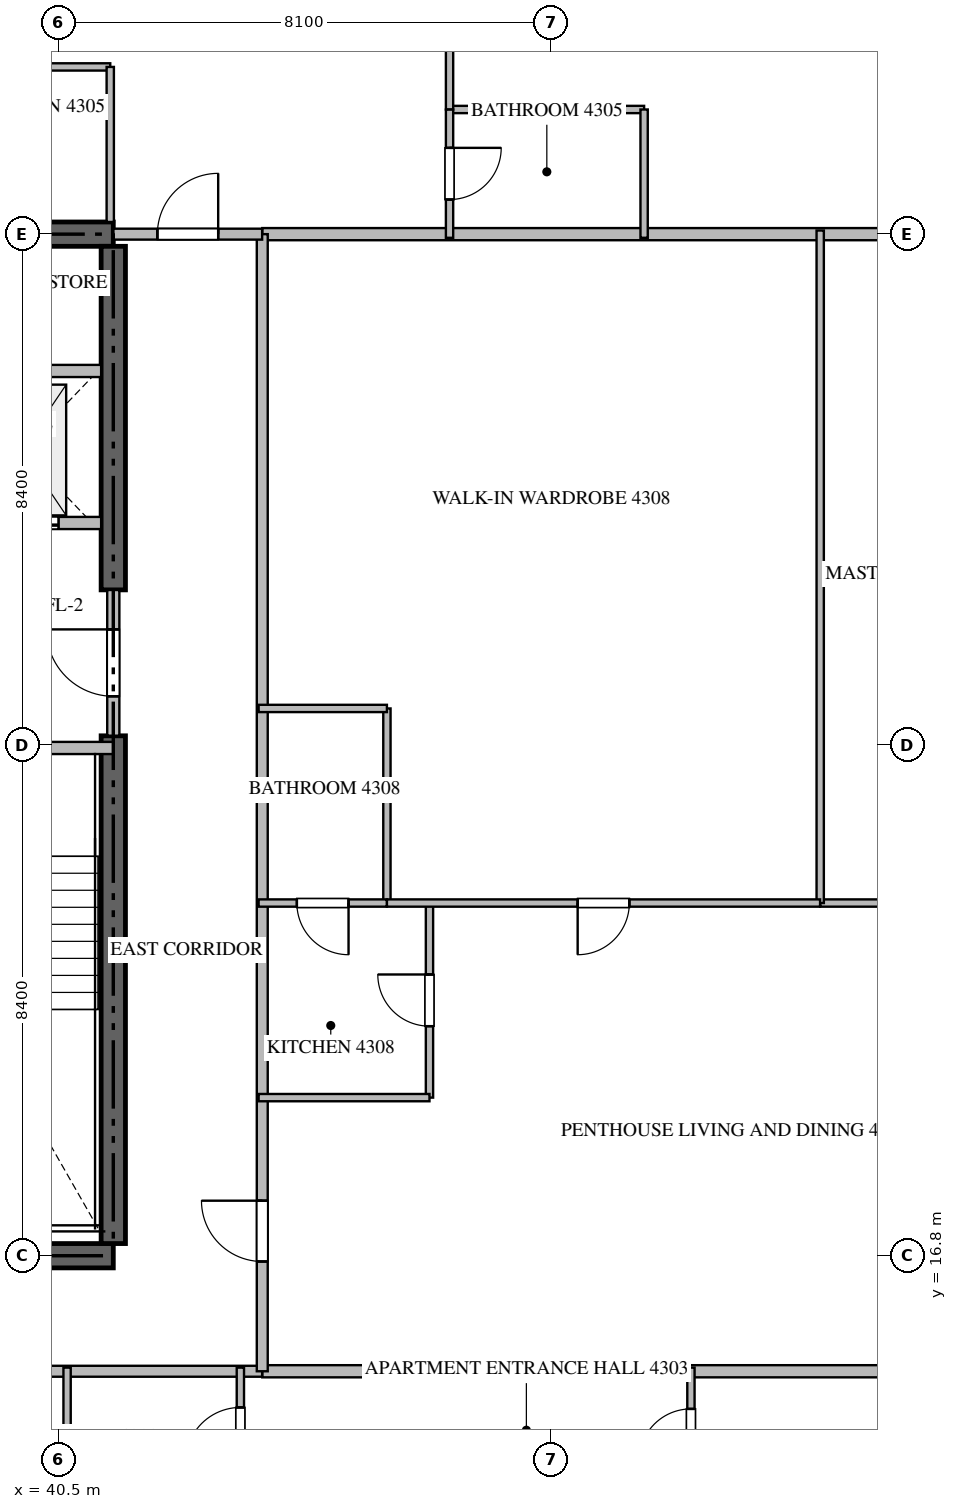
"""IFC4 building model, lengths in metres.
Left out: names, types, materials, properties, quantities, classifications, styles, units other than length and angle.
Written with IfcOpenShell. Run it as: python <this file> out.ifc"""

import sys

from ifc_helpers import new_model, si_unit, direction, frame, frame_2d, origin, place, context, subcontext, project, spatial, rectangle, extrude, source, transform, mapped, element, fill, save


model = new_model("IFC4")
c1 = context("Model", 3, precision=1e-05, world=origin(), true_north=direction((0.0, 1.0)))
c2 = subcontext(c1, "Body", "Model", "MODEL_VIEW")
j1 = project(units=[si_unit("LENGTHUNIT", "METRE"), si_unit("PLANEANGLEUNIT", "RADIAN")], contexts=[c1])
p1 = place(None, origin())
s1 = spatial("IfcSite", under=j1, at=p1, CompositionType="ELEMENT")
p2 = place(p1, origin())
s2 = spatial("IfcBuilding", under=s1, at=p2, CompositionType="ELEMENT")
p3 = place(p2, frame((0.0, 0.0, 172.65)))
s3 = spatial("IfcBuildingStorey", under=s2, at=p3, CompositionType="ELEMENT", Elevation=172.65)
for number, where, z_axis, x_axis in (
    (1, (23.4, 16.8, -0.26), (0.0, 0.0, 1.0), (1.0, 0.0, 0.0)),
    (2, (41.4, 33.6, -0.26), (0.0, 0.0, 1.0), (-1.0, 0.0, 0.0)),
):
    element("IfcWall", number, at=place(p3, frame(where, z_axis=z_axis, x_axis=x_axis)), inside=s3, PredefinedType="SHEAR", context=c2, shape_type="SweptSolid", body=[
        extrude(rectangle(XDim=18.0, YDim=0.4, at=frame_2d((9.0, 0.0))), origin(), (0.0, 0.0, 1.0), 3.748),
    ])
p4 = place(p3, frame((41.4, 17.0, -0.26), z_axis=(0.0, 0.0, 1.0), x_axis=(0.0, 1.0, 0.0)))
e3 = element("IfcWall", 3, at=p4, inside=s3, PredefinedType="SHEAR", context=c2, shape_type="SweptSolid", body=[
    extrude(rectangle(XDim=8.35, YDim=0.4, at=frame_2d((4.175, 0.0))), origin(), (0.0, 0.0, 1.0), 3.748),
])
p5 = place(p3, frame((41.4, 27.75, -0.26), z_axis=(0.0, 0.0, 1.0), x_axis=(0.0, 1.0, 0.0)))
e4 = element("IfcWall", 4, at=p5, inside=s3, PredefinedType="SHEAR", context=c2, shape_type="SweptSolid", body=[
    extrude(rectangle(XDim=5.65, YDim=0.4, at=frame_2d((2.825, 0.0))), origin(), (0.0, 0.0, 1.0), 3.748),
])
p6 = place(p3, frame((36.95, 25.15, 0.0), z_axis=(0.0, 0.0, 1.0), x_axis=(1.0, 0.0, 0.0)))
e5 = element("IfcWall", 5, at=p6, inside=s3, PredefinedType="STANDARD", context=c2, shape_type="SweptSolid", body=[
    extrude(rectangle(XDim=4.45, YDim=0.2, at=frame_2d((2.225, 0.0))), origin(), (0.0, 0.0, 1.0), 3.49),
])
p7 = place(p6, frame((1.65, 0.0, 0.0)))
e6 = element("IfcOpeningElement", 6, at=p7, cuts=e5, PredefinedType="OPENING", context=c2, shape_type="SweptSolid", body=[
    extrude(rectangle(XDim=1.1, YDim=2.15, at=frame_2d((0.55, 1.075))), frame((0.0, 0.11, 0.0), z_axis=(0.0, -1.0, 0.0), x_axis=(1.0, 0.0, 0.0)), (0.0, 0.0, 1.0), 0.22),
])
p8 = place(p3, frame((38.75, 28.85, 0.0), z_axis=(0.0, 0.0, 1.0), x_axis=(1.0, 0.0, 0.0)))
e7 = element("IfcWall", 7, at=p8, inside=s3, PredefinedType="STANDARD", context=c2, shape_type="SweptSolid", body=[
    extrude(rectangle(XDim=2.45, YDim=0.2, at=frame_2d((1.225, 0.0))), origin(), (0.0, 0.0, 1.0), 3.49),
])
p9 = place(p8, frame((0.55, 0.0, 0.0)))
e8 = element("IfcOpeningElement", 8, at=p9, cuts=e7, PredefinedType="OPENING", context=c2, shape_type="SweptSolid", body=[
    extrude(rectangle(XDim=1.2, YDim=2.2, at=frame_2d((0.6, 1.1))), frame((0.0, 0.11, 0.0), z_axis=(0.0, -1.0, 0.0), x_axis=(1.0, 0.0, 0.0)), (0.0, 0.0, 1.0), 0.22),
])
p10 = place(p3, frame((38.75, 31.35, 0.0), z_axis=(0.0, 0.0, 1.0), x_axis=(1.0, 0.0, 0.0)))
e9 = element("IfcWall", 9, at=p10, inside=s3, PredefinedType="STANDARD", context=c2, shape_type="SweptSolid", body=[
    extrude(rectangle(XDim=2.45, YDim=0.2, at=frame_2d((1.225, 0.0))), origin(), (0.0, 0.0, 1.0), 3.49),
])
p11 = place(p3, frame((41.4, 25.352, 0.0), z_axis=(0.0, 0.0, 1.0), x_axis=(0.0, 1.0, 0.0)))
e10 = element("IfcWall", 10, at=p11, inside=s3, PredefinedType="STANDARD", context=c2, shape_type="SweptSolid", body=[
    extrude(rectangle(XDim=2.396, YDim=0.2, at=frame_2d((1.198, 0.0))), origin(), (0.0, 0.0, 1.0), 3.49),
])
p12 = place(p11, frame((0.648, 0.0, 0.0)))
e11 = element("IfcOpeningElement", 11, at=p12, cuts=e10, PredefinedType="OPENING", context=c2, shape_type="SweptSolid", body=[
    extrude(rectangle(XDim=1.1, YDim=2.15, at=frame_2d((0.55, 1.075))), frame((0.0, 0.11, 0.0), z_axis=(0.0, -1.0, 0.0), x_axis=(1.0, 0.0, 0.0)), (0.0, 0.0, 1.0), 0.22),
])
for number, where, z_axis, x_axis in (
    (12, (43.85, 14.9, 0.0), (0.0, 0.0, 1.0), (1.0, 0.0, 0.0)),
    (13, (43.85, 33.6, 0.0), (0.0, 0.0, 1.0), (1.0, 0.0, 0.0)),
):
    element("IfcWall", number, at=place(p3, frame(where, z_axis=z_axis, x_axis=x_axis)), inside=s3, PredefinedType="PARTITIONING", context=c2, shape_type="SweptSolid", body=[
        extrude(rectangle(XDim=13.068, YDim=0.2, at=frame_2d((6.534, 0.0))), origin(), (0.0, 0.0, 1.0), 3.49),
    ])
p13 = place(p3, frame((20.952, 14.9, 0.0), z_axis=(0.0, 0.0, 1.0), x_axis=(1.0, 0.0, 0.0)))
e14 = element("IfcWall", 14, at=p13, inside=s3, PredefinedType="PARTITIONING", context=c2, shape_type="SweptSolid", body=[
    extrude(rectangle(XDim=22.896, YDim=0.18, at=frame_2d((11.448, 0.0))), origin(), (0.0, 0.0, 1.0), 3.49),
])
p14 = place(p13, frame((2.387, 0.0, 0.0)))
e15 = element("IfcOpeningElement", 15, at=p14, cuts=e14, PredefinedType="OPENING", context=c2, shape_type="SweptSolid", body=[
    extrude(rectangle(XDim=1.0, YDim=2.15, at=frame_2d((0.5, 1.075))), frame((0.0, 0.1, 0.0), z_axis=(0.0, -1.0, 0.0), x_axis=(1.0, 0.0, 0.0)), (0.0, 0.0, 1.0), 0.2),
])
p15 = place(p13, frame((6.591, 0.0, 0.0)))
e16 = element("IfcOpeningElement", 16, at=p15, cuts=e14, PredefinedType="OPENING", context=c2, shape_type="SweptSolid", body=[
    extrude(rectangle(XDim=1.0, YDim=2.15, at=frame_2d((0.5, 1.075))), frame((0.0, 0.1, 0.0), z_axis=(0.0, -1.0, 0.0), x_axis=(1.0, 0.0, 0.0)), (0.0, 0.0, 1.0), 0.2),
])
p16 = place(p13, frame((16.51, 0.0, 0.0)))
e17 = element("IfcOpeningElement", 17, at=p16, cuts=e14, PredefinedType="OPENING", context=c2, shape_type="SweptSolid", body=[
    extrude(rectangle(XDim=1.0, YDim=2.15, at=frame_2d((0.5, 1.075))), frame((0.0, 0.1, 0.0), z_axis=(0.0, -1.0, 0.0), x_axis=(1.0, 0.0, 0.0)), (0.0, 0.0, 1.0), 0.2),
])
p17 = place(p3, frame((43.85, 14.9, 0.0), z_axis=(0.0, 0.0, 1.0), x_axis=(0.0, 1.0, 0.0)))
e18 = element("IfcWall", 18, at=p17, inside=s3, PredefinedType="PARTITIONING", context=c2, shape_type="SweptSolid", body=[
    extrude(rectangle(XDim=18.7, YDim=0.18, at=frame_2d((9.35, 0.0))), origin(), (0.0, 0.0, 1.0), 3.49),
])
p18 = place(p17, frame((1.805, 0.0, 0.0)))
e19 = element("IfcOpeningElement", 19, at=p18, cuts=e18, PredefinedType="OPENING", context=c2, shape_type="SweptSolid", body=[
    extrude(rectangle(XDim=1.0, YDim=2.15, at=frame_2d((0.5, 1.075))), frame((0.0, 0.1, 0.0), z_axis=(0.0, -1.0, 0.0), x_axis=(1.0, 0.0, 0.0)), (0.0, 0.0, 1.0), 0.2),
])
p19 = place(p3, frame((41.402, 33.6, 0.0), z_axis=(0.0, 0.0, 1.0), x_axis=(1.0, 0.0, 0.0)))
e20 = element("IfcWall", 20, at=p19, inside=s3, PredefinedType="PARTITIONING", context=c2, shape_type="SweptSolid", body=[
    extrude(rectangle(XDim=2.446, YDim=0.18, at=frame_2d((1.223, 0.0))), origin(), (0.0, 0.0, 1.0), 3.49),
])
p20 = place(p19, frame((0.723, 0.0, 0.0)))
e21 = element("IfcOpeningElement", 21, at=p20, cuts=e20, PredefinedType="OPENING", context=c2, shape_type="SweptSolid", body=[
    extrude(rectangle(XDim=1.0, YDim=2.15, at=frame_2d((0.5, 1.075))), frame((0.0, 0.1, 0.0), z_axis=(0.0, -1.0, 0.0), x_axis=(1.0, 0.0, 0.0)), (0.0, 0.0, 1.0), 0.2),
])
p21 = place(p3, frame((40.64, 12.15, 0.0), z_axis=(0.0, 0.0, 1.0), x_axis=(0.0, 1.0, 0.0)))
e22 = element("IfcWall", 22, at=p21, inside=s3, PredefinedType="PARTITIONING", context=c2, shape_type="SweptSolid", body=[
    extrude(rectangle(XDim=2.81, YDim=0.12, at=frame_2d((1.405, 0.0))), origin(), (0.0, 0.0, 1.0), 3.49),
])
p22 = place(p3, frame((43.49, 12.75, 0.0), z_axis=(0.0, 0.0, 1.0), x_axis=(0.0, 1.0, 0.0)))
e23 = element("IfcWall", 23, at=p22, inside=s3, PredefinedType="PARTITIONING", context=c2, shape_type="SweptSolid", body=[
    extrude(rectangle(XDim=2.21, YDim=0.12, at=frame_2d((1.105, 0.0))), origin(), (0.0, 0.0, 1.0), 3.49),
])
p23 = place(p22, frame((0.655, 0.0, 0.0)))
e24 = element("IfcOpeningElement", 24, at=p23, cuts=e23, PredefinedType="OPENING", context=c2, shape_type="SweptSolid", body=[
    extrude(rectangle(XDim=0.9, YDim=2.1, at=frame_2d((0.45, 1.05))), frame((0.0, 0.07, 0.0), z_axis=(0.0, -1.0, 0.0), x_axis=(1.0, 0.0, 0.0)), (0.0, 0.0, 1.0), 0.14),
])
p24 = place(p3, frame((50.9, 12.752, 0.0), z_axis=(0.0, 0.0, 1.0), x_axis=(0.0, 1.0, 0.0)))
e25 = element("IfcWall", 25, at=p24, inside=s3, PredefinedType="PARTITIONING", context=c2, shape_type="SweptSolid", body=[
    extrude(rectangle(XDim=2.208, YDim=0.12, at=frame_2d((1.104, 0.0))), origin(), (0.0, 0.0, 1.0), 3.49),
])
p25 = place(p24, frame((0.679, 0.0, 0.0)))
e26 = element("IfcOpeningElement", 26, at=p25, cuts=e25, PredefinedType="OPENING", context=c2, shape_type="SweptSolid", body=[
    extrude(rectangle(XDim=0.85, YDim=2.1, at=frame_2d((0.425, 1.05))), frame((0.0, 0.07, 0.0), z_axis=(0.0, -1.0, 0.0), x_axis=(1.0, 0.0, 0.0)), (0.0, 0.0, 1.0), 0.14),
])
p26 = place(p3, frame((38.5, 36.35, 0.0), z_axis=(0.0, 0.0, 1.0), x_axis=(1.0, 0.0, 0.0)))
e27 = element("IfcWall", 27, at=p26, inside=s3, PredefinedType="PARTITIONING", context=c2, shape_type="SweptSolid", body=[
    extrude(rectangle(XDim=2.85, YDim=0.12, at=frame_2d((1.425, 0.0))), origin(), (0.0, 0.0, 1.0), 3.49),
])
p27 = place(p26, frame((1.0, 0.0, 0.0)))
e28 = element("IfcOpeningElement", 28, at=p27, cuts=e27, PredefinedType="OPENING", context=c2, shape_type="SweptSolid", body=[
    extrude(rectangle(XDim=0.85, YDim=2.1, at=frame_2d((0.425, 1.05))), frame((0.0, 0.07, 0.0), z_axis=(0.0, -1.0, 0.0), x_axis=(1.0, 0.0, 0.0)), (0.0, 0.0, 1.0), 0.14),
])
p28 = place(p3, frame((41.35, 36.35, 0.0), z_axis=(0.0, 0.0, 1.0), x_axis=(0.0, -1.0, 0.0)))
e29 = element("IfcWall", 29, at=p28, inside=s3, PredefinedType="PARTITIONING", context=c2, shape_type="SweptSolid", body=[
    extrude(rectangle(XDim=2.55, YDim=0.12, at=frame_2d((1.275, 0.0))), origin(), (0.0, 0.0, 1.0), 3.49),
])
p29 = place(p3, frame((46.93, 35.65, 0.0), z_axis=(0.0, 0.0, 1.0), x_axis=(1.0, 0.0, 0.0)))
e30 = element("IfcWall", 30, at=p29, inside=s3, PredefinedType="PARTITIONING", context=c2, shape_type="SweptSolid", body=[
    extrude(rectangle(XDim=3.2, YDim=0.12, at=frame_2d((1.6, 0.0))), origin(), (0.0, 0.0, 1.0), 3.49),
])
p30 = place(p3, frame((50.13, 35.65, 0.0), z_axis=(0.0, 0.0, 1.0), x_axis=(0.0, -1.0, 0.0)))
e31 = element("IfcWall", 31, at=p30, inside=s3, PredefinedType="PARTITIONING", context=c2, shape_type="SweptSolid", body=[
    extrude(rectangle(XDim=2.11, YDim=0.12, at=frame_2d((1.055, 0.0))), origin(), (0.0, 0.0, 1.0), 3.49),
])
p31 = place(p3, frame((46.93, 41.073, 0.0), z_axis=(0.0, 0.0, 1.0), x_axis=(0.0, -1.0, 0.0)))
e32 = element("IfcWall", 32, at=p31, inside=s3, PredefinedType="PARTITIONING", context=c2, shape_type="SweptSolid", body=[
    extrude(rectangle(XDim=5.423, YDim=0.12, at=frame_2d((2.711, 0.0))), origin(), (0.0, 0.0, 1.0), 3.49),
])
p32 = place(p31, frame((2.287, 0.0, 0.0)))
e33 = element("IfcOpeningElement", 33, at=p32, cuts=e32, PredefinedType="OPENING", context=c2, shape_type="SweptSolid", body=[
    extrude(rectangle(XDim=0.85, YDim=2.1, at=frame_2d((0.425, 1.05))), frame((0.0, 0.07, 0.0), z_axis=(0.0, -1.0, 0.0), x_axis=(1.0, 0.0, 0.0)), (0.0, 0.0, 1.0), 0.14),
])
p33 = place(p3, frame((46.93, 35.648, 0.0), z_axis=(0.0, 0.0, 1.0), x_axis=(0.0, -1.0, 0.0)))
e34 = element("IfcWall", 34, at=p33, inside=s3, PredefinedType="PARTITIONING", context=c2, shape_type="SweptSolid", body=[
    extrude(rectangle(XDim=2.108, YDim=0.12, at=frame_2d((1.054, 0.0))), origin(), (0.0, 0.0, 1.0), 3.49),
])
p34 = place(p33, frame((0.629, 0.0, 0.0)))
e35 = element("IfcOpeningElement", 35, at=p34, cuts=e34, PredefinedType="OPENING", context=c2, shape_type="SweptSolid", body=[
    extrude(rectangle(XDim=0.85, YDim=2.1, at=frame_2d((0.425, 1.05))), frame((0.0, 0.07, 0.0), z_axis=(0.0, -1.0, 0.0), x_axis=(1.0, 0.0, 0.0)), (0.0, 0.0, 1.0), 0.14),
])
p35 = place(p3, frame((46.6, 19.4, 0.0), z_axis=(0.0, 0.0, 1.0), x_axis=(0.0, 1.0, 0.0)))
e36 = element("IfcWall", 36, at=p35, inside=s3, PredefinedType="PARTITIONING", context=c2, shape_type="SweptSolid", body=[
    extrude(rectangle(XDim=3.2, YDim=0.12, at=frame_2d((1.6, 0.0))), origin(), (0.0, 0.0, 1.0), 3.49),
])
p36 = place(p35, frame((1.175, 0.0, 0.0)))
e37 = element("IfcOpeningElement", 37, at=p36, cuts=e36, PredefinedType="OPENING", context=c2, shape_type="SweptSolid", body=[
    extrude(rectangle(XDim=0.85, YDim=2.1, at=frame_2d((0.425, 1.05))), frame((0.0, 0.07, 0.0), z_axis=(0.0, -1.0, 0.0), x_axis=(1.0, 0.0, 0.0)), (0.0, 0.0, 1.0), 0.14),
])
p37 = place(p3, frame((46.6, 19.4, 0.0), z_axis=(0.0, 0.0, 1.0), x_axis=(-1.0, 0.0, 0.0)))
e38 = element("IfcWall", 38, at=p37, inside=s3, PredefinedType="PARTITIONING", context=c2, shape_type="SweptSolid", body=[
    extrude(rectangle(XDim=2.81, YDim=0.12, at=frame_2d((1.405, 0.0))), origin(), (0.0, 0.0, 1.0), 3.49),
])
p38 = place(p3, frame((56.905, 22.6, 0.0), z_axis=(0.0, 0.0, 1.0), x_axis=(-1.0, 0.0, 0.0)))
e39 = element("IfcWall", 39, at=p38, inside=s3, PredefinedType="PARTITIONING", context=c2, shape_type="SweptSolid", body=[
    extrude(rectangle(XDim=3.879, YDim=0.12, at=frame_2d((1.939, 0.0))), origin(), (0.0, 0.0, 1.0), 3.49),
])
p39 = place(p38, frame((1.918, 0.0, 0.0)))
e40 = element("IfcOpeningElement", 40, at=p39, cuts=e39, PredefinedType="OPENING", context=c2, shape_type="SweptSolid", body=[
    extrude(rectangle(XDim=0.9, YDim=2.1, at=frame_2d((0.45, 1.05))), frame((0.0, 0.07, 0.0), z_axis=(0.0, -1.0, 0.0), x_axis=(1.0, 0.0, 0.0)), (0.0, 0.0, 1.0), 0.14),
])
p40 = place(p3, frame((53.026, 22.6, 0.0), z_axis=(0.0, 0.0, 1.0), x_axis=(0.0, 1.0, 0.0)))
e41 = element("IfcWall", 41, at=p40, inside=s3, PredefinedType="PARTITIONING", context=c2, shape_type="SweptSolid", body=[
    extrude(rectangle(XDim=11.06, YDim=0.12, at=frame_2d((5.53, 0.0))), origin(), (0.0, 0.0, 1.0), 3.49),
])
p41 = place(p3, frame((45.9, 22.6, 0.0), z_axis=(0.0, 0.0, 1.0), x_axis=(0.0, 1.0, 0.0)))
e42 = element("IfcWall", 42, at=p41, inside=s3, PredefinedType="PARTITIONING", context=c2, shape_type="SweptSolid", body=[
    extrude(rectangle(XDim=3.2, YDim=0.12, at=frame_2d((1.6, 0.0))), origin(), (0.0, 0.0, 1.0), 3.49),
])
p42 = place(p3, frame((45.9, 25.8, 0.0), z_axis=(0.0, 0.0, 1.0), x_axis=(-1.0, 0.0, 0.0)))
e43 = element("IfcWall", 43, at=p42, inside=s3, PredefinedType="PARTITIONING", context=c2, shape_type="SweptSolid", body=[
    extrude(rectangle(XDim=2.11, YDim=0.12, at=frame_2d((1.055, 0.0))), origin(), (0.0, 0.0, 1.0), 3.49),
])
p43 = place(p3, frame((53.024, 22.6, 0.0), z_axis=(0.0, 0.0, 1.0), x_axis=(-1.0, 0.0, 0.0)))
e44 = element("IfcWall", 44, at=p43, inside=s3, PredefinedType="PARTITIONING", context=c2, shape_type="SweptSolid", body=[
    extrude(rectangle(XDim=7.124, YDim=0.12, at=frame_2d((3.562, 0.0))), origin(), (0.0, 0.0, 1.0), 3.49),
])
p44 = place(p43, frame((3.137, 0.0, 0.0)))
e45 = element("IfcOpeningElement", 45, at=p44, cuts=e44, PredefinedType="OPENING", context=c2, shape_type="SweptSolid", body=[
    extrude(rectangle(XDim=0.85, YDim=2.1, at=frame_2d((0.425, 1.05))), frame((0.0, 0.07, 0.0), z_axis=(0.0, -1.0, 0.0), x_axis=(1.0, 0.0, 0.0)), (0.0, 0.0, 1.0), 0.14),
])
p45 = place(p3, frame((45.898, 22.6, 0.0), z_axis=(0.0, 0.0, 1.0), x_axis=(-1.0, 0.0, 0.0)))
e46 = element("IfcWall", 46, at=p45, inside=s3, PredefinedType="PARTITIONING", context=c2, shape_type="SweptSolid", body=[
    extrude(rectangle(XDim=2.108, YDim=0.12, at=frame_2d((1.054, 0.0))), origin(), (0.0, 0.0, 1.0), 3.49),
])
p46 = place(p45, frame((0.629, 0.0, 0.0)))
e47 = element("IfcOpeningElement", 47, at=p46, cuts=e46, PredefinedType="OPENING", context=c2, shape_type="SweptSolid", body=[
    extrude(rectangle(XDim=0.85, YDim=2.1, at=frame_2d((0.425, 1.05))), frame((0.0, 0.07, 0.0), z_axis=(0.0, -1.0, 0.0), x_axis=(1.0, 0.0, 0.0)), (0.0, 0.0, 1.0), 0.14),
])
m1 = source(origin(), c2, "Body", "SweptSolid", [
    extrude(rectangle(XDim=1.2, YDim=2.2, at=frame_2d((0.6, 1.1))), frame((0.0, 0.025, 0.0), z_axis=(0.0, -1.0, 0.0), x_axis=(1.0, 0.0, 0.0)), (0.0, 0.0, 1.0), 0.05),
])
p47 = place(p9, origin())
e48 = element("IfcDoor", 48, at=p47, inside=s3, OperationType="DOUBLE_DOOR_SLIDING", PredefinedType="DOOR", context=c2, shape_type="MappedRepresentation", body=[
    mapped(m1, transform((0.0, 0.0, 0.0), scale=1.0)),
])
fill(e8, e48)
m2 = source(origin(), c2, "Body", "SweptSolid", [
    extrude(rectangle(XDim=1.1, YDim=2.15, at=frame_2d((0.55, 1.075))), frame((0.0, 0.025, 0.0), z_axis=(0.0, -1.0, 0.0), x_axis=(1.0, 0.0, 0.0)), (0.0, 0.0, 1.0), 0.05),
])
p48 = place(p12, origin())
e49 = element("IfcDoor", 49, at=p48, inside=s3, OperationType="SINGLE_SWING_RIGHT", PredefinedType="DOOR", context=c2, shape_type="MappedRepresentation", body=[
    mapped(m2, transform((0.0, 0.0, 0.0), scale=1.0)),
])
fill(e11, e49)
m3 = source(origin(), c2, "Body", "SweptSolid", [
    extrude(rectangle(XDim=1.0, YDim=2.15, at=frame_2d((0.5, 1.075))), frame((0.0, 0.025, 0.0), z_axis=(0.0, -1.0, 0.0), x_axis=(1.0, 0.0, 0.0)), (0.0, 0.0, 1.0), 0.05),
])
p49 = place(p18, origin())
e50 = element("IfcDoor", 50, at=p49, inside=s3, OperationType="SINGLE_SWING_RIGHT", PredefinedType="DOOR", context=c2, shape_type="MappedRepresentation", body=[
    mapped(m3, transform((0.0, 0.0, 0.0), scale=1.0)),
])
fill(e19, e50)
p50 = place(p20, origin())
e51 = element("IfcDoor", 51, at=p50, inside=s3, OperationType="SINGLE_SWING_RIGHT", PredefinedType="DOOR", context=c2, shape_type="MappedRepresentation", body=[
    mapped(m3, transform((0.0, 0.0, 0.0), scale=1.0)),
])
fill(e21, e51)
m4 = source(origin(), c2, "Body", "SweptSolid", [
    extrude(rectangle(XDim=0.9, YDim=2.1, at=frame_2d((0.45, 1.05))), frame((0.0, 0.025, 0.0), z_axis=(0.0, -1.0, 0.0), x_axis=(1.0, 0.0, 0.0)), (0.0, 0.0, 1.0), 0.05),
])
p51 = place(p23, origin())
e52 = element("IfcDoor", 52, at=p51, inside=s3, OperationType="SINGLE_SWING_LEFT", PredefinedType="DOOR", context=c2, shape_type="MappedRepresentation", body=[
    mapped(m4, transform((0.0, 0.0, 0.0), scale=1.0)),
])
fill(e24, e52)
m5 = source(origin(), c2, "Body", "SweptSolid", [
    extrude(rectangle(XDim=0.85, YDim=2.1, at=frame_2d((0.425, 1.05))), frame((0.0, 0.025, 0.0), z_axis=(0.0, -1.0, 0.0), x_axis=(1.0, 0.0, 0.0)), (0.0, 0.0, 1.0), 0.05),
])
p52 = place(p25, origin())
e53 = element("IfcDoor", 53, at=p52, inside=s3, OperationType="SINGLE_SWING_LEFT", PredefinedType="DOOR", context=c2, shape_type="MappedRepresentation", body=[
    mapped(m5, transform((0.0, 0.0, 0.0), scale=1.0)),
])
fill(e26, e53)
p53 = place(p34, origin())
e54 = element("IfcDoor", 54, at=p53, inside=s3, OperationType="SINGLE_SWING_LEFT", PredefinedType="DOOR", context=c2, shape_type="MappedRepresentation", body=[
    mapped(m5, transform((0.0, 0.0, 0.0), scale=1.0)),
])
fill(e35, e54)
p54 = place(p36, origin())
e55 = element("IfcDoor", 55, at=p54, inside=s3, OperationType="SINGLE_SWING_RIGHT", PredefinedType="DOOR", context=c2, shape_type="MappedRepresentation", body=[
    mapped(m5, transform((0.0, 0.0, 0.0), scale=1.0)),
])
fill(e37, e55)
p55 = place(p44, origin())
e56 = element("IfcDoor", 56, at=p55, inside=s3, OperationType="SINGLE_SWING_RIGHT", PredefinedType="DOOR", context=c2, shape_type="MappedRepresentation", body=[
    mapped(m5, transform((0.0, 0.0, 0.0), scale=1.0)),
])
fill(e45, e56)
p56 = place(p46, origin())
e57 = element("IfcDoor", 57, at=p56, inside=s3, OperationType="SINGLE_SWING_LEFT", PredefinedType="DOOR", context=c2, shape_type="MappedRepresentation", body=[
    mapped(m5, transform((0.0, 0.0, 0.0), scale=1.0)),
])
fill(e47, e57)
save(model, sys.argv[1])
